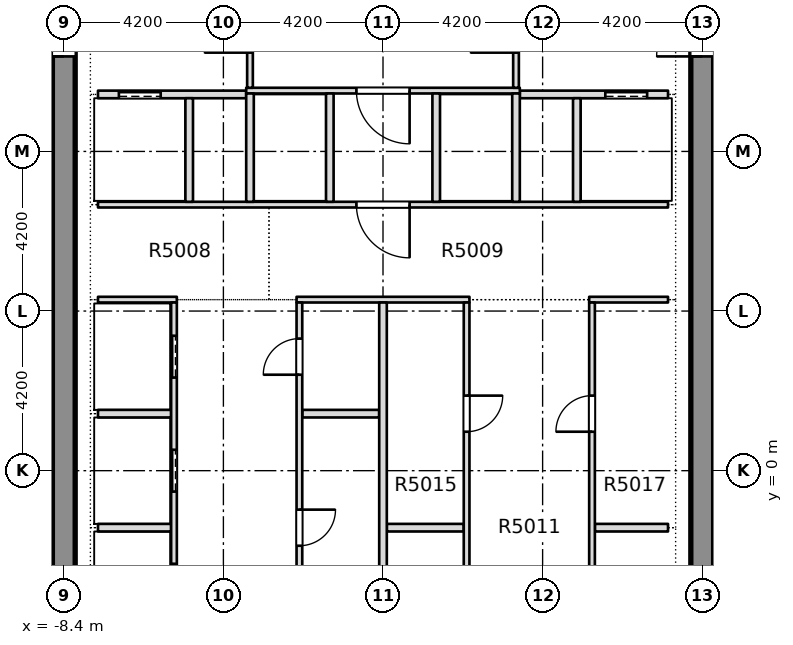
"""IFC4 building model, lengths in metres.
Left out: names, types, materials, properties, quantities, classifications, styles, units other than length and angle.
Written with IfcOpenShell. Run it as: python <this file> out.ifc"""

import sys

from ifc_helpers import new_model, si_unit, direction, frame, frame_2d, origin, place, context, subcontext, project, spatial, rectangle, extrude, element, fill, save


model = new_model("IFC4")
c1 = context("Model", 3, precision=1e-05, world=origin(), true_north=direction((0.0, 1.0)))
c2 = subcontext(c1, "Body", "Model", "MODEL_VIEW")
j1 = project(units=[si_unit("LENGTHUNIT", "METRE"), si_unit("PLANEANGLEUNIT", "RADIAN")], contexts=[c1])
p1 = place(None, origin())
s1 = spatial("IfcSite", under=j1, at=p1, CompositionType="ELEMENT")
p2 = place(p1, origin())
s2 = spatial("IfcBuilding", under=s1, at=p2, CompositionType="ELEMENT")
p3 = place(p2, frame((0.0, 0.0, 192.8)))
s3 = spatial("IfcBuildingStorey", under=s2, at=p3, CompositionType="ELEMENT", Elevation=192.8)
p4 = place(p3, frame((-8.4, -7.8, -0.4), z_axis=(0.0, 0.0, 1.0), x_axis=(0.0, 1.0, 0.0)))
e1 = element("IfcWall", 1, at=p4, inside=s3, PredefinedType="SHEAR", context=c2, shape_type="SweptSolid", body=[
    extrude(rectangle(XDim=28.95, YDim=0.6, at=frame_2d((14.475, 0.0))), origin(), (0.0, 0.0, 1.0), 3.45),
])
p5 = place(p4, frame((18.7, 0.0, 0.4)))
e2 = element("IfcOpeningElement", 2, at=p5, cuts=e1, PredefinedType="OPENING", context=c2, shape_type="SweptSolid", body=[
    extrude(rectangle(XDim=1.2, YDim=2.1, at=frame_2d((0.6, 1.05))), frame((0.0, 0.31, 0.0), z_axis=(0.0, -1.0, 0.0), x_axis=(1.0, 0.0, 0.0)), (0.0, 0.0, 1.0), 0.62),
])
p6 = place(p3, frame((8.4, -7.8, -0.4), z_axis=(0.0, 0.0, 1.0), x_axis=(0.0, 1.0, 0.0)))
e3 = element("IfcWall", 3, at=p6, inside=s3, PredefinedType="SHEAR", context=c2, shape_type="SweptSolid", body=[
    extrude(rectangle(XDim=28.95, YDim=0.6, at=frame_2d((14.475, 0.0))), origin(), (0.0, 0.0, 1.0), 3.45),
])
p7 = place(p6, frame((18.7, 0.0, 0.4)))
e4 = element("IfcOpeningElement", 4, at=p7, cuts=e3, PredefinedType="OPENING", context=c2, shape_type="SweptSolid", body=[
    extrude(rectangle(XDim=1.2, YDim=2.1, at=frame_2d((0.6, 1.05))), frame((0.0, 0.31, 0.0), z_axis=(0.0, -1.0, 0.0), x_axis=(1.0, 0.0, 0.0)), (0.0, 0.0, 1.0), 0.62),
])
p8 = place(p3, frame((-7.5, -1.5, 0.0), z_axis=(0.0, 0.0, 1.0), x_axis=(1.0, 0.0, 0.0)))
e5 = element("IfcWall", 5, at=p8, inside=s3, PredefinedType="PARTITIONING", context=c2, shape_type="SweptSolid", body=[
    extrude(rectangle(XDim=1.925, YDim=0.2, at=frame_2d((0.962, 0.0))), origin(), (0.0, 0.0, 1.0), 3.05),
])
p9 = place(p3, frame((0.1, -1.5, 0.0), z_axis=(0.0, 0.0, 1.0), x_axis=(1.0, 0.0, 0.0)))
e6 = element("IfcWall", 6, at=p9, inside=s3, PredefinedType="PARTITIONING", context=c2, shape_type="SweptSolid", body=[
    extrude(rectangle(XDim=2.025, YDim=0.2, at=frame_2d((1.012, 0.0))), origin(), (0.0, 0.0, 1.0), 3.05),
])
for number, where, z_axis, x_axis in (
    (7, (5.575, -1.5, 0.0), (0.0, 0.0, 1.0), (1.0, 0.0, 0.0)),
    (8, (-7.5, 1.5, 0.0), (0.0, 0.0, 1.0), (1.0, 0.0, 0.0)),
):
    element("IfcWall", number, at=place(p3, frame(where, z_axis=z_axis, x_axis=x_axis)), inside=s3, PredefinedType="PARTITIONING", context=c2, shape_type="SweptSolid", body=[
        extrude(rectangle(XDim=1.925, YDim=0.2, at=frame_2d((0.962, 0.0))), origin(), (0.0, 0.0, 1.0), 3.05),
    ])
p10 = place(p3, frame((-2.125, 1.5, 0.0), z_axis=(0.0, 0.0, 1.0), x_axis=(1.0, 0.0, 0.0)))
e9 = element("IfcWall", 9, at=p10, inside=s3, PredefinedType="PARTITIONING", context=c2, shape_type="SweptSolid", body=[
    extrude(rectangle(XDim=2.025, YDim=0.2, at=frame_2d((1.012, 0.0))), origin(), (0.0, 0.0, 1.0), 3.05),
])
p11 = place(p3, frame((-7.5, 4.5, 0.0), z_axis=(0.0, 0.0, 1.0), x_axis=(1.0, 0.0, 0.0)))
e10 = element("IfcWall", 10, at=p11, inside=s3, PredefinedType="PARTITIONING", context=c2, shape_type="SweptSolid", body=[
    extrude(rectangle(XDim=2.075, YDim=0.15, at=frame_2d((1.038, 0.0))), origin(), (0.0, 0.0, 1.0), 3.05),
])
p12 = place(p3, frame((-2.275, 4.5, 0.0), z_axis=(0.0, 0.0, 1.0), x_axis=(1.0, 0.0, 0.0)))
e11 = element("IfcWall", 11, at=p12, inside=s3, PredefinedType="PARTITIONING", context=c2, shape_type="SweptSolid", body=[
    extrude(rectangle(XDim=4.55, YDim=0.15, at=frame_2d((2.275, 0.0))), origin(), (0.0, 0.0, 1.0), 3.05),
])
p13 = place(p3, frame((5.425, 4.5, 0.0), z_axis=(0.0, 0.0, 1.0), x_axis=(1.0, 0.0, 0.0)))
e12 = element("IfcWall", 12, at=p13, inside=s3, PredefinedType="PARTITIONING", context=c2, shape_type="SweptSolid", body=[
    extrude(rectangle(XDim=2.075, YDim=0.15, at=frame_2d((1.038, 0.0))), origin(), (0.0, 0.0, 1.0), 3.05),
])
p14 = place(p3, frame((-7.5, 7.0, 0.0), z_axis=(0.0, 0.0, 1.0), x_axis=(1.0, 0.0, 0.0)))
e13 = element("IfcWall", 13, at=p14, inside=s3, PredefinedType="PARTITIONING", context=c2, shape_type="SweptSolid", body=[
    extrude(rectangle(XDim=15.0, YDim=0.15, at=frame_2d((7.5, 0.0))), origin(), (0.0, 0.0, 1.0), 3.05),
])
p15 = place(p14, frame((6.8, 0.0, 0.0)))
e14 = element("IfcOpeningElement", 14, at=p15, cuts=e13, PredefinedType="OPENING", context=c2, shape_type="SweptSolid", body=[
    extrude(rectangle(XDim=1.4, YDim=2.1, at=frame_2d((0.7, 1.05))), frame((0.0, 0.085, 0.0), z_axis=(0.0, -1.0, 0.0), x_axis=(1.0, 0.0, 0.0)), (0.0, 0.0, 1.0), 0.17),
])
p16 = place(p3, frame((-7.5, 9.9, 0.0), z_axis=(0.0, 0.0, 1.0), x_axis=(1.0, 0.0, 0.0)))
e15 = element("IfcWall", 15, at=p16, inside=s3, PredefinedType="PARTITIONING", context=c2, shape_type="SweptSolid", body=[
    extrude(rectangle(XDim=3.9, YDim=0.2, at=frame_2d((1.95, 0.0))), origin(), (0.0, 0.0, 1.0), 3.05),
])
p17 = place(p16, frame((0.55, 0.0, 0.0)))
e16 = element("IfcOpeningElement", 16, at=p17, cuts=e15, PredefinedType="OPENING", context=c2, shape_type="SweptSolid", body=[
    extrude(rectangle(XDim=1.1, YDim=2.1, at=frame_2d((0.55, 1.05))), frame((0.0, 0.11, 0.0), z_axis=(0.0, -1.0, 0.0), x_axis=(1.0, 0.0, 0.0)), (0.0, 0.0, 1.0), 0.22),
])
p18 = place(p3, frame((3.6, 9.9, 0.0), z_axis=(0.0, 0.0, 1.0), x_axis=(1.0, 0.0, 0.0)))
e17 = element("IfcWall", 17, at=p18, inside=s3, PredefinedType="PARTITIONING", context=c2, shape_type="SweptSolid", body=[
    extrude(rectangle(XDim=3.9, YDim=0.2, at=frame_2d((1.95, 0.0))), origin(), (0.0, 0.0, 1.0), 3.05),
])
p19 = place(p18, frame((2.25, 0.0, 0.0)))
e18 = element("IfcOpeningElement", 18, at=p19, cuts=e17, PredefinedType="OPENING", context=c2, shape_type="SweptSolid", body=[
    extrude(rectangle(XDim=1.1, YDim=2.1, at=frame_2d((0.55, 1.05))), frame((0.0, 0.11, 0.0), z_axis=(0.0, -1.0, 0.0), x_axis=(1.0, 0.0, 0.0)), (0.0, 0.0, 1.0), 0.22),
])
p20 = place(p3, frame((-3.6, 10.0, 0.0), z_axis=(0.0, 0.0, 1.0), x_axis=(1.0, 0.0, 0.0)))
e19 = element("IfcWall", 19, at=p20, inside=s3, PredefinedType="PARTITIONING", context=c2, shape_type="SweptSolid", body=[
    extrude(rectangle(XDim=7.2, YDim=0.15, at=frame_2d((3.6, 0.0))), origin(), (0.0, 0.0, 1.0), 3.05),
])
p21 = place(p20, frame((2.9, 0.0, 0.0)))
e20 = element("IfcOpeningElement", 20, at=p21, cuts=e19, PredefinedType="OPENING", context=c2, shape_type="SweptSolid", body=[
    extrude(rectangle(XDim=1.4, YDim=2.1, at=frame_2d((0.7, 1.05))), frame((0.0, 0.085, 0.0), z_axis=(0.0, -1.0, 0.0), x_axis=(1.0, 0.0, 0.0)), (0.0, 0.0, 1.0), 0.17),
])
p22 = place(p3, frame((-5.5, -7.799, 0.0), z_axis=(0.0, 0.0, 1.0), x_axis=(0.0, 1.0, 0.0)))
e21 = element("IfcWall", 21, at=p22, inside=s3, PredefinedType="PARTITIONING", context=c2, shape_type="SweptSolid", body=[
    extrude(rectangle(XDim=12.224, YDim=0.15, at=frame_2d((6.112, 0.0))), origin(), (0.0, 0.0, 1.0), 3.05),
])
p23 = place(p22, frame((1.249, 0.0, 0.0)))
e22 = element("IfcOpeningElement", 22, at=p23, cuts=e21, PredefinedType="OPENING", context=c2, shape_type="SweptSolid", body=[
    extrude(rectangle(XDim=1.1, YDim=2.1, at=frame_2d((0.55, 1.05))), frame((0.0, 0.085, 0.0), z_axis=(0.0, -1.0, 0.0), x_axis=(1.0, 0.0, 0.0)), (0.0, 0.0, 1.0), 0.17),
])
p24 = place(p22, frame((4.249, 0.0, 0.0)))
e23 = element("IfcOpeningElement", 23, at=p24, cuts=e21, PredefinedType="OPENING", context=c2, shape_type="SweptSolid", body=[
    extrude(rectangle(XDim=1.1, YDim=2.1, at=frame_2d((0.55, 1.05))), frame((0.0, 0.085, 0.0), z_axis=(0.0, -1.0, 0.0), x_axis=(1.0, 0.0, 0.0)), (0.0, 0.0, 1.0), 0.17),
])
p25 = place(p22, frame((7.249, 0.0, 0.0)))
e24 = element("IfcOpeningElement", 24, at=p25, cuts=e21, PredefinedType="OPENING", context=c2, shape_type="SweptSolid", body=[
    extrude(rectangle(XDim=1.1, YDim=2.1, at=frame_2d((0.55, 1.05))), frame((0.0, 0.085, 0.0), z_axis=(0.0, -1.0, 0.0), x_axis=(1.0, 0.0, 0.0)), (0.0, 0.0, 1.0), 0.17),
])
p26 = place(p22, frame((10.249, 0.0, 0.0)))
e25 = element("IfcOpeningElement", 25, at=p26, cuts=e21, PredefinedType="OPENING", context=c2, shape_type="SweptSolid", body=[
    extrude(rectangle(XDim=1.1, YDim=2.1, at=frame_2d((0.55, 1.05))), frame((0.0, 0.085, 0.0), z_axis=(0.0, -1.0, 0.0), x_axis=(1.0, 0.0, 0.0)), (0.0, 0.0, 1.0), 0.17),
])
p27 = place(p3, frame((-5.1, 7.075, 0.0), z_axis=(0.0, 0.0, 1.0), x_axis=(0.0, 1.0, 0.0)))
e26 = element("IfcWall", 26, at=p27, inside=s3, PredefinedType="PARTITIONING", context=c2, shape_type="SweptSolid", body=[
    extrude(rectangle(XDim=2.725, YDim=0.2, at=frame_2d((1.363, 0.0))), origin(), (0.0, 0.0, 1.0), 3.05),
])
p28 = place(p3, frame((-3.5, 7.075, 0.0), z_axis=(0.0, 0.0, 1.0), x_axis=(0.0, 1.0, 0.0)))
e27 = element("IfcWall", 27, at=p28, inside=s3, PredefinedType="PARTITIONING", context=c2, shape_type="SweptSolid", body=[
    extrude(rectangle(XDim=2.85, YDim=0.2, at=frame_2d((1.425, 0.0))), origin(), (0.0, 0.0, 1.0), 3.05),
])
p29 = place(p3, frame((-3.5, 10.075, 0.0), z_axis=(0.0, 0.0, 1.0), x_axis=(0.0, 1.0, 0.0)))
e28 = element("IfcWall", 28, at=p29, inside=s3, PredefinedType="PARTITIONING", context=c2, shape_type="SweptSolid", body=[
    extrude(rectangle(XDim=3.075, YDim=0.15, at=frame_2d((1.538, 0.0))), origin(), (0.0, 0.0, 1.0), 3.05),
])
p30 = place(p29, frame((0.925, 0.0, 0.0)))
e29 = element("IfcOpeningElement", 29, at=p30, cuts=e28, PredefinedType="OPENING", context=c2, shape_type="SweptSolid", body=[
    extrude(rectangle(XDim=1.2, YDim=2.1, at=frame_2d((0.6, 1.05))), frame((0.0, 0.085, 0.0), z_axis=(0.0, -1.0, 0.0), x_axis=(1.0, 0.0, 0.0)), (0.0, 0.0, 1.0), 0.17),
])
p31 = place(p3, frame((-2.2, -7.799, 0.0), z_axis=(0.0, 0.0, 1.0), x_axis=(0.0, 1.0, 0.0)))
e30 = element("IfcWall", 30, at=p31, inside=s3, PredefinedType="PARTITIONING", context=c2, shape_type="SweptSolid", body=[
    extrude(rectangle(XDim=12.224, YDim=0.15, at=frame_2d((6.112, 0.0))), origin(), (0.0, 0.0, 1.0), 3.05),
])
p32 = place(p31, frame((1.249, 0.0, 0.0)))
e31 = element("IfcOpeningElement", 31, at=p32, cuts=e30, PredefinedType="OPENING", context=c2, shape_type="SweptSolid", body=[
    extrude(rectangle(XDim=1.1, YDim=2.1, at=frame_2d((0.55, 1.05))), frame((0.0, 0.085, 0.0), z_axis=(0.0, -1.0, 0.0), x_axis=(1.0, 0.0, 0.0)), (0.0, 0.0, 1.0), 0.17),
])
p33 = place(p31, frame((5.824, 0.0, 0.0)))
e32 = element("IfcOpeningElement", 32, at=p33, cuts=e30, PredefinedType="OPENING", context=c2, shape_type="SweptSolid", body=[
    extrude(rectangle(XDim=0.95, YDim=2.1, at=frame_2d((0.475, 1.05))), frame((0.0, 0.085, 0.0), z_axis=(0.0, -1.0, 0.0), x_axis=(1.0, 0.0, 0.0)), (0.0, 0.0, 1.0), 0.17),
])
p34 = place(p31, frame((10.324, 0.0, 0.0)))
e33 = element("IfcOpeningElement", 33, at=p34, cuts=e30, PredefinedType="OPENING", context=c2, shape_type="SweptSolid", body=[
    extrude(rectangle(XDim=0.95, YDim=2.1, at=frame_2d((0.475, 1.05))), frame((0.0, 0.085, 0.0), z_axis=(0.0, -1.0, 0.0), x_axis=(1.0, 0.0, 0.0)), (0.0, 0.0, 1.0), 0.17),
])
p35 = place(p3, frame((-1.4, 7.075, 0.0), z_axis=(0.0, 0.0, 1.0), x_axis=(0.0, 1.0, 0.0)))
e34 = element("IfcWall", 34, at=p35, inside=s3, PredefinedType="PARTITIONING", context=c2, shape_type="SweptSolid", body=[
    extrude(rectangle(XDim=2.85, YDim=0.2, at=frame_2d((1.425, 0.0))), origin(), (0.0, 0.0, 1.0), 3.05),
])
p36 = place(p3, frame((0.0, -7.799, 0.0), z_axis=(0.0, 0.0, 1.0), x_axis=(0.0, 1.0, 0.0)))
e35 = element("IfcWall", 35, at=p36, inside=s3, PredefinedType="PARTITIONING", context=c2, shape_type="SweptSolid", body=[
    extrude(rectangle(XDim=12.224, YDim=0.2, at=frame_2d((6.112, 0.0))), origin(), (0.0, 0.0, 1.0), 3.05),
])
p37 = place(p3, frame((1.4, 7.075, 0.0), z_axis=(0.0, 0.0, 1.0), x_axis=(0.0, 1.0, 0.0)))
e36 = element("IfcWall", 36, at=p37, inside=s3, PredefinedType="PARTITIONING", context=c2, shape_type="SweptSolid", body=[
    extrude(rectangle(XDim=2.85, YDim=0.2, at=frame_2d((1.425, 0.0))), origin(), (0.0, 0.0, 1.0), 3.05),
])
p38 = place(p3, frame((2.2, -7.799, 0.0), z_axis=(0.0, 0.0, 1.0), x_axis=(0.0, 1.0, 0.0)))
e37 = element("IfcWall", 37, at=p38, inside=s3, PredefinedType="PARTITIONING", context=c2, shape_type="SweptSolid", body=[
    extrude(rectangle(XDim=12.224, YDim=0.15, at=frame_2d((6.112, 0.0))), origin(), (0.0, 0.0, 1.0), 3.05),
])
p39 = place(p38, frame((2.824, 0.0, 0.0)))
e38 = element("IfcOpeningElement", 38, at=p39, cuts=e37, PredefinedType="OPENING", context=c2, shape_type="SweptSolid", body=[
    extrude(rectangle(XDim=0.95, YDim=2.1, at=frame_2d((0.475, 1.05))), frame((0.0, 0.085, 0.0), z_axis=(0.0, -1.0, 0.0), x_axis=(1.0, 0.0, 0.0)), (0.0, 0.0, 1.0), 0.17),
])
p40 = place(p38, frame((8.824, 0.0, 0.0)))
e39 = element("IfcOpeningElement", 39, at=p40, cuts=e37, PredefinedType="OPENING", context=c2, shape_type="SweptSolid", body=[
    extrude(rectangle(XDim=0.95, YDim=2.1, at=frame_2d((0.475, 1.05))), frame((0.0, 0.085, 0.0), z_axis=(0.0, -1.0, 0.0), x_axis=(1.0, 0.0, 0.0)), (0.0, 0.0, 1.0), 0.17),
])
p41 = place(p3, frame((3.5, 7.075, 0.0), z_axis=(0.0, 0.0, 1.0), x_axis=(0.0, 1.0, 0.0)))
e40 = element("IfcWall", 40, at=p41, inside=s3, PredefinedType="PARTITIONING", context=c2, shape_type="SweptSolid", body=[
    extrude(rectangle(XDim=2.85, YDim=0.2, at=frame_2d((1.425, 0.0))), origin(), (0.0, 0.0, 1.0), 3.05),
])
p42 = place(p3, frame((3.5, 10.075, 0.0), z_axis=(0.0, 0.0, 1.0), x_axis=(0.0, 1.0, 0.0)))
e41 = element("IfcWall", 41, at=p42, inside=s3, PredefinedType="PARTITIONING", context=c2, shape_type="SweptSolid", body=[
    extrude(rectangle(XDim=3.075, YDim=0.15, at=frame_2d((1.538, 0.0))), origin(), (0.0, 0.0, 1.0), 3.05),
])
p43 = place(p42, frame((0.925, 0.0, 0.0)))
e42 = element("IfcOpeningElement", 42, at=p43, cuts=e41, PredefinedType="OPENING", context=c2, shape_type="SweptSolid", body=[
    extrude(rectangle(XDim=1.2, YDim=2.1, at=frame_2d((0.6, 1.05))), frame((0.0, 0.085, 0.0), z_axis=(0.0, -1.0, 0.0), x_axis=(1.0, 0.0, 0.0)), (0.0, 0.0, 1.0), 0.17),
])
p44 = place(p3, frame((5.1, 7.075, 0.0), z_axis=(0.0, 0.0, 1.0), x_axis=(0.0, 1.0, 0.0)))
e43 = element("IfcWall", 43, at=p44, inside=s3, PredefinedType="PARTITIONING", context=c2, shape_type="SweptSolid", body=[
    extrude(rectangle(XDim=2.725, YDim=0.2, at=frame_2d((1.363, 0.0))), origin(), (0.0, 0.0, 1.0), 3.05),
])
p45 = place(p3, frame((5.5, -7.799, 0.0), z_axis=(0.0, 0.0, 1.0), x_axis=(0.0, 1.0, 0.0)))
e44 = element("IfcWall", 44, at=p45, inside=s3, PredefinedType="PARTITIONING", context=c2, shape_type="SweptSolid", body=[
    extrude(rectangle(XDim=12.224, YDim=0.15, at=frame_2d((6.112, 0.0))), origin(), (0.0, 0.0, 1.0), 3.05),
])
p46 = place(p45, frame((2.824, 0.0, 0.0)))
e45 = element("IfcOpeningElement", 45, at=p46, cuts=e44, PredefinedType="OPENING", context=c2, shape_type="SweptSolid", body=[
    extrude(rectangle(XDim=0.95, YDim=2.1, at=frame_2d((0.475, 1.05))), frame((0.0, 0.085, 0.0), z_axis=(0.0, -1.0, 0.0), x_axis=(1.0, 0.0, 0.0)), (0.0, 0.0, 1.0), 0.17),
])
p47 = place(p45, frame((8.824, 0.0, 0.0)))
e46 = element("IfcOpeningElement", 46, at=p47, cuts=e44, PredefinedType="OPENING", context=c2, shape_type="SweptSolid", body=[
    extrude(rectangle(XDim=0.95, YDim=2.1, at=frame_2d((0.475, 1.05))), frame((0.0, 0.085, 0.0), z_axis=(0.0, -1.0, 0.0), x_axis=(1.0, 0.0, 0.0)), (0.0, 0.0, 1.0), 0.17),
])
p48 = place(p24, origin())
e47 = element("IfcDoor", 47, at=p48, inside=s3, OperationType="SLIDING_TO_LEFT", PredefinedType="DOOR", context=c2, shape_type="SweptSolid", body=[
    extrude(rectangle(XDim=1.1, YDim=2.1, at=frame_2d((0.55, 1.05))), frame((0.0, 0.025, 0.0), z_axis=(0.0, -1.0, 0.0), x_axis=(1.0, 0.0, 0.0)), (0.0, 0.0, 1.0), 0.05),
])
fill(e23, e47)
p49 = place(p25, origin())
e48 = element("IfcDoor", 48, at=p49, inside=s3, OperationType="SLIDING_TO_LEFT", PredefinedType="DOOR", context=c2, shape_type="SweptSolid", body=[
    extrude(rectangle(XDim=1.1, YDim=2.1, at=frame_2d((0.55, 1.05))), frame((0.0, 0.025, 0.0), z_axis=(0.0, -1.0, 0.0), x_axis=(1.0, 0.0, 0.0)), (0.0, 0.0, 1.0), 0.05),
])
fill(e24, e48)
p50 = place(p26, origin())
e49 = element("IfcDoor", 49, at=p50, inside=s3, OperationType="SLIDING_TO_LEFT", PredefinedType="DOOR", context=c2, shape_type="SweptSolid", body=[
    extrude(rectangle(XDim=1.1, YDim=2.1, at=frame_2d((0.55, 1.05))), frame((0.0, 0.025, 0.0), z_axis=(0.0, -1.0, 0.0), x_axis=(1.0, 0.0, 0.0)), (0.0, 0.0, 1.0), 0.05),
])
fill(e25, e49)
p51 = place(p33, origin())
e50 = element("IfcDoor", 50, at=p51, inside=s3, OperationType="SINGLE_SWING_LEFT", PredefinedType="DOOR", context=c2, shape_type="SweptSolid", body=[
    extrude(rectangle(XDim=0.95, YDim=2.1, at=frame_2d((0.475, 1.05))), frame((0.0, 0.025, 0.0), z_axis=(0.0, -1.0, 0.0), x_axis=(1.0, 0.0, 0.0)), (0.0, 0.0, 1.0), 0.05),
])
fill(e32, e50)
p52 = place(p34, origin())
e51 = element("IfcDoor", 51, at=p52, inside=s3, OperationType="SINGLE_SWING_RIGHT", PredefinedType="DOOR", context=c2, shape_type="SweptSolid", body=[
    extrude(rectangle(XDim=0.95, YDim=2.1, at=frame_2d((0.475, 1.05))), frame((0.0, 0.025, 0.0), z_axis=(0.0, -1.0, 0.0), x_axis=(1.0, 0.0, 0.0)), (0.0, 0.0, 1.0), 0.05),
])
fill(e33, e51)
p53 = place(p40, origin())
e52 = element("IfcDoor", 52, at=p53, inside=s3, OperationType="SINGLE_SWING_RIGHT", PredefinedType="DOOR", context=c2, shape_type="SweptSolid", body=[
    extrude(rectangle(XDim=0.95, YDim=2.1, at=frame_2d((0.475, 1.05))), frame((0.0, 0.025, 0.0), z_axis=(0.0, -1.0, 0.0), x_axis=(1.0, 0.0, 0.0)), (0.0, 0.0, 1.0), 0.05),
])
fill(e39, e52)
p54 = place(p47, origin())
e53 = element("IfcDoor", 53, at=p54, inside=s3, OperationType="SINGLE_SWING_LEFT", PredefinedType="DOOR", context=c2, shape_type="SweptSolid", body=[
    extrude(rectangle(XDim=0.95, YDim=2.1, at=frame_2d((0.475, 1.05))), frame((0.0, 0.025, 0.0), z_axis=(0.0, -1.0, 0.0), x_axis=(1.0, 0.0, 0.0)), (0.0, 0.0, 1.0), 0.05),
])
fill(e46, e53)
p55 = place(p17, origin())
e54 = element("IfcDoor", 54, at=p55, inside=s3, OperationType="SLIDING_TO_RIGHT", PredefinedType="DOOR", context=c2, shape_type="SweptSolid", body=[
    extrude(rectangle(XDim=1.1, YDim=2.1, at=frame_2d((0.55, 1.05))), frame((0.0, 0.025, 0.0), z_axis=(0.0, -1.0, 0.0), x_axis=(1.0, 0.0, 0.0)), (0.0, 0.0, 1.0), 0.05),
])
fill(e16, e54)
p56 = place(p19, origin())
e55 = element("IfcDoor", 55, at=p56, inside=s3, OperationType="SLIDING_TO_LEFT", PredefinedType="DOOR", context=c2, shape_type="SweptSolid", body=[
    extrude(rectangle(XDim=1.1, YDim=2.1, at=frame_2d((0.55, 1.05))), frame((0.0, 0.025, 0.0), z_axis=(0.0, -1.0, 0.0), x_axis=(1.0, 0.0, 0.0)), (0.0, 0.0, 1.0), 0.05),
])
fill(e18, e55)
p57 = place(p15, origin())
e56 = element("IfcDoor", 56, at=p57, inside=s3, OperationType="SINGLE_SWING_RIGHT", PredefinedType="DOOR", context=c2, shape_type="SweptSolid", body=[
    extrude(rectangle(XDim=1.4, YDim=2.1, at=frame_2d((0.7, 1.05))), frame((0.0, 0.025, 0.0), z_axis=(0.0, -1.0, 0.0), x_axis=(1.0, 0.0, 0.0)), (0.0, 0.0, 1.0), 0.05),
])
fill(e14, e56)
p58 = place(p21, origin())
e57 = element("IfcDoor", 57, at=p58, inside=s3, OperationType="SINGLE_SWING_RIGHT", PredefinedType="DOOR", context=c2, shape_type="SweptSolid", body=[
    extrude(rectangle(XDim=1.4, YDim=2.1, at=frame_2d((0.7, 1.05))), frame((0.0, 0.025, 0.0), z_axis=(0.0, -1.0, 0.0), x_axis=(1.0, 0.0, 0.0)), (0.0, 0.0, 1.0), 0.05),
])
fill(e20, e57)
p59 = place(p5, origin())
e58 = element("IfcDoor", 58, at=p59, inside=s3, OperationType="SINGLE_SWING_LEFT", PredefinedType="DOOR", context=c2, shape_type="SweptSolid", body=[
    extrude(rectangle(XDim=1.2, YDim=2.1, at=frame_2d((0.6, 1.05))), frame((0.0, 0.025, 0.0), z_axis=(0.0, -1.0, 0.0), x_axis=(1.0, 0.0, 0.0)), (0.0, 0.0, 1.0), 0.05),
])
fill(e2, e58)
p60 = place(p7, origin())
e59 = element("IfcDoor", 59, at=p60, inside=s3, OperationType="SINGLE_SWING_LEFT", PredefinedType="DOOR", context=c2, shape_type="SweptSolid", body=[
    extrude(rectangle(XDim=1.2, YDim=2.1, at=frame_2d((0.6, 1.05))), frame((0.0, 0.025, 0.0), z_axis=(0.0, -1.0, 0.0), x_axis=(1.0, 0.0, 0.0)), (0.0, 0.0, 1.0), 0.05),
])
fill(e4, e59)
save(model, sys.argv[1])
